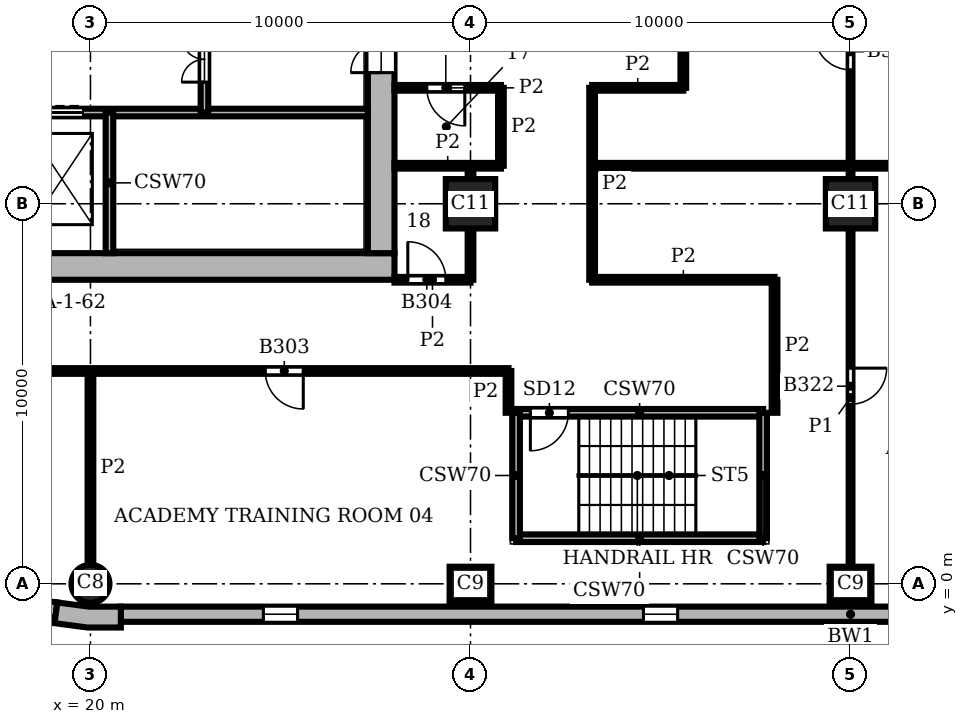
"""IFC4 building model, lengths in metres.
Left out: names, types, materials, properties, quantities, classifications, styles, units other than length and angle.
Written with IfcOpenShell. Run it as: python <this file> out.ifc"""

import sys

from ifc_helpers import new_model, si_unit, direction, frame, frame_2d, origin, origin_2d, place, context, subcontext, project, spatial, polyline, rectangle, circle, outline, extrude, element, fill, save


model = new_model("IFC4")
c1 = context("Model", 3, precision=1e-05, world=origin(), true_north=direction((0.0, 1.0)))
c2 = subcontext(c1, "Body", "Model", "MODEL_VIEW")
j1 = project(units=[si_unit("LENGTHUNIT", "METRE"), si_unit("PLANEANGLEUNIT", "RADIAN")], contexts=[c1])
p1 = place(None, origin())
s1 = spatial("IfcSite", under=j1, at=p1, CompositionType="ELEMENT")
p2 = place(p1, origin())
s2 = spatial("IfcBuilding", under=s1, at=p2, CompositionType="ELEMENT")
p3 = place(p2, frame((0.0, 0.0, 155.1)))
s3 = spatial("IfcBuildingStorey", under=s2, at=p3, CompositionType="ELEMENT", Elevation=155.1)
p4 = place(p3, frame((20.0, 0.0, 0.0), z_axis=(0.0, 0.0, 1.0), x_axis=(1.0, 0.0, 0.0)))
e1 = element("IfcColumn", 1, at=p4, inside=s3, PredefinedType="COLUMN", context=c2, shape_type="SweptSolid", body=[
    extrude(circle(Radius=0.5, at=origin_2d()), origin(), (0.0, 0.0, 1.0), 3.9),
])
for number, where, z_axis, x_axis in (
    (2, (30.0, 0.0, 0.0), (0.0, 0.0, 1.0), (1.0, 0.0, 0.0)),
    (3, (40.0, 0.0, 0.0), (0.0, 0.0, 1.0), (1.0, 0.0, 0.0)),
):
    element("IfcColumn", number, at=place(p3, frame(where, z_axis=z_axis, x_axis=x_axis)), inside=s3, PredefinedType="COLUMN", context=c2, shape_type="SweptSolid", body=[
        extrude(rectangle(XDim=1.1, YDim=0.9, at=origin_2d()), origin(), (0.0, 0.0, 1.0), 3.9),
    ])
for number, where, z_axis, x_axis in (
    (4, (30.0, 10.0, 0.0), (0.0, 0.0, 1.0), (1.0, 0.0, 0.0)),
    (5, (40.0, 10.0, 0.0), (0.0, 0.0, 1.0), (1.0, 0.0, 0.0)),
):
    element("IfcColumn", number, at=place(p3, frame(where, z_axis=z_axis, x_axis=x_axis)), inside=s3, PredefinedType="COLUMN", context=c2, shape_type="SweptSolid", body=[
        extrude(rectangle(XDim=1.3, YDim=1.3, at=origin_2d()), origin(), (0.0, 0.0, 1.0), 3.9),
    ])
p5 = place(p3, frame((8.0, 8.35, 0.0), z_axis=(0.0, 0.0, 1.0), x_axis=(1.0, 0.0, 0.0)))
e6 = element("IfcWall", 6, at=p5, inside=s3, PredefinedType="SHEAR", context=c2, shape_type="SweptSolid", body=[
    extrude(rectangle(XDim=20.0, YDim=0.7, at=frame_2d((10.0, 0.0))), origin(), (0.0, 0.0, 1.0), 3.9),
])
p6 = place(p3, frame((27.65, 8.7, 0.0), z_axis=(0.0, 0.0, 1.0), x_axis=(0.0, 1.0, 0.0)))
e7 = element("IfcWall", 7, at=p6, inside=s3, PredefinedType="SHEAR", context=c2, shape_type="SweptSolid", body=[
    extrude(rectangle(XDim=18.6, YDim=0.7, at=frame_2d((9.3, 0.0))), origin(), (0.0, 0.0, 1.0), 3.9),
])
p7 = place(p6, frame((4.75, 0.0, 0.0)))
e8 = element("IfcOpeningElement", 8, at=p7, cuts=e7, PredefinedType="OPENING", context=c2, shape_type="SweptSolid", body=[
    extrude(rectangle(XDim=1.6, YDim=2.1, at=frame_2d((0.8, 1.05))), frame((0.0, 0.36, 0.0), z_axis=(0.0, -1.0, 0.0), x_axis=(1.0, 0.0, 0.0)), (0.0, 0.0, 1.0), 0.72),
])
p8 = place(p3, origin())
e9 = element("IfcWall", 9, at=p8, inside=s3, PredefinedType="SOLIDWALL", context=c2, shape_type="SweptSolid", body=[
    extrude(outline(polyline([(19.076, -0.887), (19.057, -1.036), (19.925, -1.15), (20.8, -1.15), (20.8, -1.0), (20.8, -0.6), (19.961, -0.6), (19.128, -0.49), (19.076, -0.887)])), origin(), (0.0, 0.0, 1.0), 3.9),
])
p9 = place(p3, frame((20.8, -0.8, 0.0), z_axis=(0.0, 0.0, 1.0), x_axis=(1.0, 0.0, 0.0)))
e10 = element("IfcWall", 10, at=p9, inside=s3, PredefinedType="SOLIDWALL", context=c2, shape_type="SweptSolid", body=[
    extrude(rectangle(XDim=38.4, YDim=0.4, at=frame_2d((19.2, 0.0))), origin(), (0.0, 0.0, 1.0), 3.9),
])
p10 = place(p9, frame((3.75, 0.0, 0.9)))
e11 = element("IfcOpeningElement", 11, at=p10, cuts=e10, PredefinedType="OPENING", context=c2, shape_type="SweptSolid", body=[
    extrude(rectangle(XDim=0.9, YDim=2.35, at=frame_2d((0.45, 1.175))), frame((0.0, 0.21, 0.0), z_axis=(0.0, -1.0, 0.0), x_axis=(1.0, 0.0, 0.0)), (0.0, 0.0, 1.0), 0.42),
])
p11 = place(p9, frame((13.75, 0.0, 0.9)))
e12 = element("IfcOpeningElement", 12, at=p11, cuts=e10, PredefinedType="OPENING", context=c2, shape_type="SweptSolid", body=[
    extrude(rectangle(XDim=0.9, YDim=2.35, at=frame_2d((0.45, 1.175))), frame((0.0, 0.21, 0.0), z_axis=(0.0, -1.0, 0.0), x_axis=(1.0, 0.0, 0.0)), (0.0, 0.0, 1.0), 0.42),
])
p12 = place(p9, frame((23.75, 0.0, 0.9)))
e13 = element("IfcOpeningElement", 13, at=p12, cuts=e10, PredefinedType="OPENING", context=c2, shape_type="SweptSolid", body=[
    extrude(rectangle(XDim=0.9, YDim=2.35, at=frame_2d((0.45, 1.175))), frame((0.0, 0.21, 0.0), z_axis=(0.0, -1.0, 0.0), x_axis=(1.0, 0.0, 0.0)), (0.0, 0.0, 1.0), 0.42),
])
p13 = place(p9, frame((33.75, 0.0, 0.9)))
e14 = element("IfcOpeningElement", 14, at=p13, cuts=e10, PredefinedType="OPENING", context=c2, shape_type="SweptSolid", body=[
    extrude(rectangle(XDim=0.9, YDim=2.35, at=frame_2d((0.45, 1.175))), frame((0.0, 0.21, 0.0), z_axis=(0.0, -1.0, 0.0), x_axis=(1.0, 0.0, 0.0)), (0.0, 0.0, 1.0), 0.42),
])
p14 = place(p3, frame((15.017, -0.151, 0.0), z_axis=(0.0, 0.0, 1.0), x_axis=(0.991446429508, -0.130514280502, 0.0)))
e15 = element("IfcWall", 15, at=p14, inside=s3, PredefinedType="SOLIDWALL", context=c2, shape_type="SweptSolid", body=[
    extrude(rectangle(XDim=4.121, YDim=0.4, at=frame_2d((2.061, 0.0))), origin(), (0.0, 0.0, 1.0), 3.9),
])
p15 = place(p14, frame((1.611, 0.0, 0.9)))
e16 = element("IfcOpeningElement", 16, at=p15, cuts=e15, PredefinedType="OPENING", context=c2, shape_type="SweptSolid", body=[
    extrude(rectangle(XDim=0.9, YDim=2.35, at=frame_2d((0.45, 1.175))), frame((0.0, 0.21, 0.0), z_axis=(0.0, -1.0, 0.0), x_axis=(1.0, 0.0, 0.0)), (0.0, 0.0, 1.0), 0.42),
])
p16 = place(p3, frame((31.2, 1.2, 0.0), z_axis=(0.0, 0.0, 1.0), x_axis=(1.0, 0.0, 0.0)))
e17 = element("IfcWall", 17, at=p16, inside=s3, PredefinedType="SHEAR", context=c2, shape_type="SweptSolid", body=[
    extrude(rectangle(XDim=6.5, YDim=0.2, at=frame_2d((3.25, 0.0))), origin(), (0.0, 0.0, 1.0), 3.58),
])
p17 = place(p3, frame((31.2, 4.5, 0.0), z_axis=(0.0, 0.0, 1.0), x_axis=(1.0, 0.0, 0.0)))
e18 = element("IfcWall", 18, at=p17, inside=s3, PredefinedType="SHEAR", context=c2, shape_type="SweptSolid", body=[
    extrude(rectangle(XDim=6.5, YDim=0.2, at=frame_2d((3.25, 0.0))), origin(), (0.0, 0.0, 1.0), 3.58),
])
p18 = place(p17, frame((0.375, 0.0, 0.0)))
e19 = element("IfcOpeningElement", 19, at=p18, cuts=e18, PredefinedType="OPENING", context=c2, shape_type="SweptSolid", body=[
    extrude(rectangle(XDim=1.0, YDim=2.1, at=frame_2d((0.5, 1.05))), frame((0.0, 0.11, 0.0), z_axis=(0.0, -1.0, 0.0), x_axis=(1.0, 0.0, 0.0)), (0.0, 0.0, 1.0), 0.22),
])
p19 = place(p3, frame((13.8, 12.4, 0.0), z_axis=(0.0, 0.0, 1.0), x_axis=(1.0, 0.0, 0.0)))
e20 = element("IfcWall", 20, at=p19, inside=s3, PredefinedType="SHEAR", context=c2, shape_type="SweptSolid", body=[
    extrude(rectangle(XDim=13.5, YDim=0.2, at=frame_2d((6.75, 0.0))), origin(), (0.0, 0.0, 1.0), 3.58),
])
p20 = place(p19, frame((2.4, 0.0, 0.0)))
e21 = element("IfcOpeningElement", 21, at=p20, cuts=e20, PredefinedType="OPENING", context=c2, shape_type="SweptSolid", body=[
    extrude(rectangle(XDim=1.1, YDim=2.1, at=frame_2d((0.55, 1.05))), frame((0.0, 0.11, 0.0), z_axis=(0.0, -1.0, 0.0), x_axis=(1.0, 0.0, 0.0)), (0.0, 0.0, 1.0), 0.22),
])
p21 = place(p19, frame((4.9, 0.0, 0.0)))
e22 = element("IfcOpeningElement", 22, at=p21, cuts=e20, PredefinedType="OPENING", context=c2, shape_type="SweptSolid", body=[
    extrude(rectangle(XDim=1.1, YDim=2.1, at=frame_2d((0.55, 1.05))), frame((0.0, 0.11, 0.0), z_axis=(0.0, -1.0, 0.0), x_axis=(1.0, 0.0, 0.0)), (0.0, 0.0, 1.0), 0.22),
])
p22 = place(p19, frame((0.2, 0.0, 0.0)))
e23 = element("IfcOpeningElement", 23, at=p22, cuts=e20, PredefinedType="OPENING", context=c2, shape_type="SweptSolid", body=[
    extrude(rectangle(XDim=1.0, YDim=2.1, at=frame_2d((0.5, 1.05))), frame((0.0, 0.11, 0.0), z_axis=(0.0, -1.0, 0.0), x_axis=(1.0, 0.0, 0.0)), (0.0, 0.0, 1.0), 0.22),
])
p23 = place(p3, frame((20.5, 8.7, 0.0), z_axis=(0.0, 0.0, 1.0), x_axis=(0.0, 1.0, 0.0)))
e24 = element("IfcWall", 24, at=p23, inside=s3, PredefinedType="SHEAR", context=c2, shape_type="SweptSolid", body=[
    extrude(rectangle(XDim=3.7, YDim=0.2, at=frame_2d((1.85, 0.0))), origin(), (0.0, 0.0, 1.0), 3.58),
])
p24 = place(p3, frame((23.0, 12.4, 0.0), z_axis=(0.0, 0.0, 1.0), x_axis=(0.0, 1.0, 0.0)))
e25 = element("IfcWall", 25, at=p24, inside=s3, PredefinedType="SHEAR", context=c2, shape_type="SweptSolid", body=[
    extrude(rectangle(XDim=2.8, YDim=0.2, at=frame_2d((1.4, 0.0))), origin(), (0.0, 0.0, 1.0), 3.58),
])
p25 = place(p24, frame((0.8, 0.0, 0.0)))
e26 = element("IfcOpeningElement", 26, at=p25, cuts=e25, PredefinedType="OPENING", context=c2, shape_type="SweptSolid", body=[
    extrude(rectangle(XDim=1.2, YDim=2.1, at=frame_2d((0.6, 1.05))), frame((0.0, 0.11, 0.0), z_axis=(0.0, -1.0, 0.0), x_axis=(1.0, 0.0, 0.0)), (0.0, 0.0, 1.0), 0.22),
])
for number, where, z_axis, x_axis in (
    (27, (31.2, 1.2, 0.0), (0.0, 0.0, 1.0), (0.0, 1.0, 0.0)),
    (28, (37.7, 1.2, 0.0), (0.0, 0.0, 1.0), (0.0, 1.0, 0.0)),
):
    element("IfcWall", number, at=place(p3, frame(where, z_axis=z_axis, x_axis=x_axis)), inside=s3, PredefinedType="SHEAR", context=c2, shape_type="SweptSolid", body=[
        extrude(rectangle(XDim=3.3, YDim=0.2, at=frame_2d((1.65, 0.0))), origin(), (0.0, 0.0, 1.0), 3.58),
    ])
p26 = place(p3, frame((40.0, 0.45, 0.0), z_axis=(0.0, 0.0, 1.0), x_axis=(0.0, 1.0, 0.0)))
e29 = element("IfcWall", 29, at=p26, inside=s3, PredefinedType="PARTITIONING", context=c2, shape_type="SweptSolid", body=[
    extrude(rectangle(XDim=8.9, YDim=0.1, at=frame_2d((4.45, 0.0))), origin(), (0.0, 0.0, 1.0), 3.58),
])
p27 = place(p26, frame((4.275, 0.0, 0.0)))
e30 = element("IfcOpeningElement", 30, at=p27, cuts=e29, PredefinedType="OPENING", context=c2, shape_type="SweptSolid", body=[
    extrude(rectangle(XDim=0.95, YDim=2.1, at=frame_2d((0.475, 1.05))), frame((0.0, 0.06, 0.0), z_axis=(0.0, -1.0, 0.0), x_axis=(1.0, 0.0, 0.0)), (0.0, 0.0, 1.0), 0.12),
])
p28 = place(p3, frame((40.0, 10.65, 0.0), z_axis=(0.0, 0.0, 1.0), x_axis=(0.0, 1.0, 0.0)))
e31 = element("IfcWall", 31, at=p28, inside=s3, PredefinedType="PARTITIONING", context=c2, shape_type="SweptSolid", body=[
    extrude(rectangle(XDim=8.7, YDim=0.1, at=frame_2d((4.35, 0.0))), origin(), (0.0, 0.0, 1.0), 3.58),
])
p29 = place(p28, frame((2.875, 0.0, 0.0)))
e32 = element("IfcOpeningElement", 32, at=p29, cuts=e31, PredefinedType="OPENING", context=c2, shape_type="SweptSolid", body=[
    extrude(rectangle(XDim=0.95, YDim=2.1, at=frame_2d((0.475, 1.05))), frame((0.0, 0.06, 0.0), z_axis=(0.0, -1.0, 0.0), x_axis=(1.0, 0.0, 0.0)), (0.0, 0.0, 1.0), 0.12),
])
p30 = place(p3, frame((20.0, 0.5, 0.0), z_axis=(0.0, 0.0, 1.0), x_axis=(0.0, 1.0, 0.0)))
e33 = element("IfcWall", 33, at=p30, inside=s3, PredefinedType="PARTITIONING", context=c2, shape_type="SweptSolid", body=[
    extrude(rectangle(XDim=5.1, YDim=0.15, at=frame_2d((2.55, 0.0))), origin(), (0.0, 0.0, 1.0), 3.58),
])
p31 = place(p3, frame((30.0, 8.0, 0.0), z_axis=(0.0, 0.0, 1.0), x_axis=(0.0, 1.0, 0.0)))
e34 = element("IfcWall", 34, at=p31, inside=s3, PredefinedType="PARTITIONING", context=c2, shape_type="SweptSolid", body=[
    extrude(rectangle(XDim=1.35, YDim=0.15, at=frame_2d((0.675, 0.0))), origin(), (0.0, 0.0, 1.0), 3.58),
])
p32 = place(p3, frame((30.0, 10.65, 0.0), z_axis=(0.0, 0.0, 1.0), x_axis=(0.0, 1.0, 0.0)))
e35 = element("IfcWall", 35, at=p32, inside=s3, PredefinedType="PARTITIONING", context=c2, shape_type="SweptSolid", body=[
    extrude(rectangle(XDim=0.35, YDim=0.15, at=frame_2d((0.175, 0.0))), origin(), (0.0, 0.0, 1.0), 3.58),
])
p33 = place(p3, frame((30.8, 11.0, 0.0), z_axis=(0.0, 0.0, 1.0), x_axis=(0.0, 1.0, 0.0)))
e36 = element("IfcWall", 36, at=p33, inside=s3, PredefinedType="PARTITIONING", context=c2, shape_type="SweptSolid", body=[
    extrude(rectangle(XDim=2.05, YDim=0.15, at=frame_2d((1.025, 0.0))), origin(), (0.0, 0.0, 1.0), 3.58),
])
p34 = place(p3, frame((31.0, 4.5, 0.0), z_axis=(0.0, 0.0, 1.0), x_axis=(0.0, 1.0, 0.0)))
e37 = element("IfcWall", 37, at=p34, inside=s3, PredefinedType="PARTITIONING", context=c2, shape_type="SweptSolid", body=[
    extrude(rectangle(XDim=1.1, YDim=0.15, at=frame_2d((0.55, 0.0))), origin(), (0.0, 0.0, 1.0), 3.58),
])
p35 = place(p3, frame((33.2, 8.0, 0.0), z_axis=(0.0, 0.0, 1.0), x_axis=(0.0, 1.0, 0.0)))
e38 = element("IfcWall", 38, at=p35, inside=s3, PredefinedType="PARTITIONING", context=c2, shape_type="SweptSolid", body=[
    extrude(rectangle(XDim=5.05, YDim=0.15, at=frame_2d((2.525, 0.0))), origin(), (0.0, 0.0, 1.0), 3.58),
])
p36 = place(p3, frame((35.6, 13.05, 0.0), z_axis=(0.0, 0.0, 1.0), x_axis=(0.0, 1.0, 0.0)))
e39 = element("IfcWall", 39, at=p36, inside=s3, PredefinedType="PARTITIONING", context=c2, shape_type="SweptSolid", body=[
    extrude(rectangle(XDim=2.4, YDim=0.15, at=frame_2d((1.2, 0.0))), origin(), (0.0, 0.0, 1.0), 3.58),
])
p37 = place(p3, frame((38.0, 4.5, 0.0), z_axis=(0.0, 0.0, 1.0), x_axis=(0.0, 1.0, 0.0)))
e40 = element("IfcWall", 40, at=p37, inside=s3, PredefinedType="PARTITIONING", context=c2, shape_type="SweptSolid", body=[
    extrude(rectangle(XDim=3.5, YDim=0.15, at=frame_2d((1.75, 0.0))), origin(), (0.0, 0.0, 1.0), 3.58),
])
p38 = place(p3, frame((5.6, 5.6, 0.0), z_axis=(0.0, 0.0, 1.0), x_axis=(1.0, 0.0, 0.0)))
e41 = element("IfcWall", 41, at=p38, inside=s3, PredefinedType="PARTITIONING", context=c2, shape_type="SweptSolid", body=[
    extrude(rectangle(XDim=25.4, YDim=0.15, at=frame_2d((12.7, 0.0))), origin(), (0.0, 0.0, 1.0), 3.58),
])
p39 = place(p38, frame((5.6, 0.0, 0.0)))
e42 = element("IfcOpeningElement", 42, at=p39, cuts=e41, PredefinedType="OPENING", context=c2, shape_type="SweptSolid", body=[
    extrude(rectangle(XDim=0.8, YDim=2.1, at=frame_2d((0.4, 1.05))), frame((0.0, 0.085, 0.0), z_axis=(0.0, -1.0, 0.0), x_axis=(1.0, 0.0, 0.0)), (0.0, 0.0, 1.0), 0.17),
])
p40 = place(p38, frame((11.0, 0.0, 0.0)))
e43 = element("IfcOpeningElement", 43, at=p40, cuts=e41, PredefinedType="OPENING", context=c2, shape_type="SweptSolid", body=[
    extrude(rectangle(XDim=1.1, YDim=2.1, at=frame_2d((0.55, 1.05))), frame((0.0, 0.085, 0.0), z_axis=(0.0, -1.0, 0.0), x_axis=(1.0, 0.0, 0.0)), (0.0, 0.0, 1.0), 0.17),
])
p41 = place(p38, frame((19.0, 0.0, 0.0)))
e44 = element("IfcOpeningElement", 44, at=p41, cuts=e41, PredefinedType="OPENING", context=c2, shape_type="SweptSolid", body=[
    extrude(rectangle(XDim=1.0, YDim=2.1, at=frame_2d((0.5, 1.05))), frame((0.0, 0.085, 0.0), z_axis=(0.0, -1.0, 0.0), x_axis=(1.0, 0.0, 0.0)), (0.0, 0.0, 1.0), 0.17),
])
p42 = place(p3, frame((28.0, 8.0, 0.0), z_axis=(0.0, 0.0, 1.0), x_axis=(1.0, 0.0, 0.0)))
e45 = element("IfcWall", 45, at=p42, inside=s3, PredefinedType="PARTITIONING", context=c2, shape_type="SweptSolid", body=[
    extrude(rectangle(XDim=2.0, YDim=0.15, at=frame_2d((1.0, 0.0))), origin(), (0.0, 0.0, 1.0), 3.58),
])
p43 = place(p42, frame((0.35, 0.0, 0.0)))
e46 = element("IfcOpeningElement", 46, at=p43, cuts=e45, PredefinedType="OPENING", context=c2, shape_type="SweptSolid", body=[
    extrude(rectangle(XDim=1.0, YDim=2.1, at=frame_2d((0.5, 1.05))), frame((0.0, 0.085, 0.0), z_axis=(0.0, -1.0, 0.0), x_axis=(1.0, 0.0, 0.0)), (0.0, 0.0, 1.0), 0.17),
])
p44 = place(p3, frame((33.2, 8.0, 0.0), z_axis=(0.0, 0.0, 1.0), x_axis=(1.0, 0.0, 0.0)))
e47 = element("IfcWall", 47, at=p44, inside=s3, PredefinedType="PARTITIONING", context=c2, shape_type="SweptSolid", body=[
    extrude(rectangle(XDim=4.8, YDim=0.15, at=frame_2d((2.4, 0.0))), origin(), (0.0, 0.0, 1.0), 3.58),
])
p45 = place(p3, frame((28.0, 11.0, 0.0), z_axis=(0.0, 0.0, 1.0), x_axis=(1.0, 0.0, 0.0)))
e48 = element("IfcWall", 48, at=p45, inside=s3, PredefinedType="PARTITIONING", context=c2, shape_type="SweptSolid", body=[
    extrude(rectangle(XDim=2.8, YDim=0.15, at=frame_2d((1.4, 0.0))), origin(), (0.0, 0.0, 1.0), 3.58),
])
p46 = place(p3, frame((33.2, 11.0, 0.0), z_axis=(0.0, 0.0, 1.0), x_axis=(1.0, 0.0, 0.0)))
e49 = element("IfcWall", 49, at=p46, inside=s3, PredefinedType="PARTITIONING", context=c2, shape_type="SweptSolid", body=[
    extrude(rectangle(XDim=16.8, YDim=0.15, at=frame_2d((8.4, 0.0))), origin(), (0.0, 0.0, 1.0), 3.58),
])
p47 = place(p3, frame((28.0, 13.05, 0.0), z_axis=(0.0, 0.0, 1.0), x_axis=(1.0, 0.0, 0.0)))
e50 = element("IfcWall", 50, at=p47, inside=s3, PredefinedType="PARTITIONING", context=c2, shape_type="SweptSolid", body=[
    extrude(rectangle(XDim=2.8, YDim=0.15, at=frame_2d((1.4, 0.0))), origin(), (0.0, 0.0, 1.0), 3.58),
])
p48 = place(p47, frame((0.85, 0.0, 0.0)))
e51 = element("IfcOpeningElement", 51, at=p48, cuts=e50, PredefinedType="OPENING", context=c2, shape_type="SweptSolid", body=[
    extrude(rectangle(XDim=1.0, YDim=2.1, at=frame_2d((0.5, 1.05))), frame((0.0, 0.085, 0.0), z_axis=(0.0, -1.0, 0.0), x_axis=(1.0, 0.0, 0.0)), (0.0, 0.0, 1.0), 0.17),
])
p49 = place(p3, frame((33.2, 13.05, 0.0), z_axis=(0.0, 0.0, 1.0), x_axis=(1.0, 0.0, 0.0)))
e52 = element("IfcWall", 52, at=p49, inside=s3, PredefinedType="PARTITIONING", context=c2, shape_type="SweptSolid", body=[
    extrude(rectangle(XDim=2.4, YDim=0.15, at=frame_2d((1.2, 0.0))), origin(), (0.0, 0.0, 1.0), 3.58),
])
p50 = place(p10, origin())
e53 = element("IfcWindow", 53, at=p50, inside=s3, PartitioningType="SINGLE_PANEL", PredefinedType="WINDOW", context=c2, shape_type="SweptSolid", body=[
    extrude(rectangle(XDim=0.9, YDim=2.35, at=frame_2d((0.45, 1.175))), frame((0.0, 0.16, 0.0), z_axis=(0.0, -1.0, 0.0), x_axis=(1.0, 0.0, 0.0)), (0.0, 0.0, 1.0), 0.06),
])
fill(e11, e53)
p51 = place(p11, origin())
e54 = element("IfcWindow", 54, at=p51, inside=s3, PartitioningType="SINGLE_PANEL", PredefinedType="WINDOW", context=c2, shape_type="SweptSolid", body=[
    extrude(rectangle(XDim=0.9, YDim=2.35, at=frame_2d((0.45, 1.175))), frame((0.0, 0.16, 0.0), z_axis=(0.0, -1.0, 0.0), x_axis=(1.0, 0.0, 0.0)), (0.0, 0.0, 1.0), 0.06),
])
fill(e12, e54)
p52 = place(p21, origin())
e55 = element("IfcDoor", 55, at=p52, inside=s3, OperationType="DOUBLE_DOOR_SLIDING", PredefinedType="DOOR", context=c2, shape_type="SweptSolid", body=[
    extrude(rectangle(XDim=1.1, YDim=2.1, at=frame_2d((0.55, 1.05))), frame((0.0, 0.025, 0.0), z_axis=(0.0, -1.0, 0.0), x_axis=(1.0, 0.0, 0.0)), (0.0, 0.0, 1.0), 0.05),
])
fill(e22, e55)
p53 = place(p18, frame((1.0, 0.0, 0.0), z_axis=(0.0, 0.0, 1.0), x_axis=(-1.0, 0.0, 0.0)))
e56 = element("IfcDoor", 56, at=p53, inside=s3, OperationType="SINGLE_SWING_RIGHT", PredefinedType="DOOR", context=c2, shape_type="SweptSolid", body=[
    extrude(rectangle(XDim=1.0, YDim=2.1, at=frame_2d((0.5, 1.05))), frame((0.0, 0.025, 0.0), z_axis=(0.0, -1.0, 0.0), x_axis=(1.0, 0.0, 0.0)), (0.0, 0.0, 1.0), 0.05),
])
fill(e19, e56)
p54 = place(p25, origin())
e57 = element("IfcDoor", 57, at=p54, inside=s3, OperationType="DOUBLE_DOOR_SINGLE_SWING", PredefinedType="DOOR", context=c2, shape_type="SweptSolid", body=[
    extrude(rectangle(XDim=1.2, YDim=2.1, at=frame_2d((0.6, 1.05))), frame((0.0, 0.025, 0.0), z_axis=(0.0, -1.0, 0.0), x_axis=(1.0, 0.0, 0.0)), (0.0, 0.0, 1.0), 0.05),
])
fill(e26, e57)
p55 = place(p7, origin())
e58 = element("IfcDoor", 58, at=p55, inside=s3, OperationType="DOUBLE_DOOR_SINGLE_SWING", PredefinedType="DOOR", context=c2, shape_type="SweptSolid", body=[
    extrude(rectangle(XDim=1.6, YDim=2.1, at=frame_2d((0.8, 1.05))), frame((0.0, 0.025, 0.0), z_axis=(0.0, -1.0, 0.0), x_axis=(1.0, 0.0, 0.0)), (0.0, 0.0, 1.0), 0.05),
])
fill(e8, e58)
p56 = place(p41, frame((1.0, 0.0, 0.0), z_axis=(0.0, 0.0, 1.0), x_axis=(-1.0, 0.0, 0.0)))
e59 = element("IfcDoor", 59, at=p56, inside=s3, OperationType="SINGLE_SWING_LEFT", PredefinedType="DOOR", context=c2, shape_type="SweptSolid", body=[
    extrude(rectangle(XDim=1.0, YDim=2.1, at=frame_2d((0.5, 1.05))), frame((0.0, 0.025, 0.0), z_axis=(0.0, -1.0, 0.0), x_axis=(1.0, 0.0, 0.0)), (0.0, 0.0, 1.0), 0.05),
])
fill(e44, e59)
p57 = place(p43, origin())
e60 = element("IfcDoor", 60, at=p57, inside=s3, OperationType="SINGLE_SWING_LEFT", PredefinedType="DOOR", context=c2, shape_type="SweptSolid", body=[
    extrude(rectangle(XDim=1.0, YDim=2.1, at=frame_2d((0.5, 1.05))), frame((0.0, 0.025, 0.0), z_axis=(0.0, -1.0, 0.0), x_axis=(1.0, 0.0, 0.0)), (0.0, 0.0, 1.0), 0.05),
])
fill(e46, e60)
p58 = place(p48, frame((1.0, 0.0, 0.0), z_axis=(0.0, 0.0, 1.0), x_axis=(-1.0, 0.0, 0.0)))
e61 = element("IfcDoor", 61, at=p58, inside=s3, OperationType="SINGLE_SWING_LEFT", PredefinedType="DOOR", context=c2, shape_type="SweptSolid", body=[
    extrude(rectangle(XDim=1.0, YDim=2.1, at=frame_2d((0.5, 1.05))), frame((0.0, 0.025, 0.0), z_axis=(0.0, -1.0, 0.0), x_axis=(1.0, 0.0, 0.0)), (0.0, 0.0, 1.0), 0.05),
])
fill(e51, e61)
p59 = place(p27, frame((0.95, 0.0, 0.0), z_axis=(0.0, 0.0, 1.0), x_axis=(-1.0, 0.0, 0.0)))
e62 = element("IfcDoor", 62, at=p59, inside=s3, OperationType="SINGLE_SWING_LEFT", PredefinedType="DOOR", context=c2, shape_type="SweptSolid", body=[
    extrude(rectangle(XDim=0.95, YDim=2.1, at=frame_2d((0.475, 1.05))), frame((0.0, 0.025, 0.0), z_axis=(0.0, -1.0, 0.0), x_axis=(1.0, 0.0, 0.0)), (0.0, 0.0, 1.0), 0.05),
])
fill(e30, e62)
p60 = place(p29, origin())
e63 = element("IfcDoor", 63, at=p60, inside=s3, OperationType="SINGLE_SWING_RIGHT", PredefinedType="DOOR", context=c2, shape_type="SweptSolid", body=[
    extrude(rectangle(XDim=0.95, YDim=2.1, at=frame_2d((0.475, 1.05))), frame((0.0, 0.025, 0.0), z_axis=(0.0, -1.0, 0.0), x_axis=(1.0, 0.0, 0.0)), (0.0, 0.0, 1.0), 0.05),
])
fill(e32, e63)
save(model, sys.argv[1])
